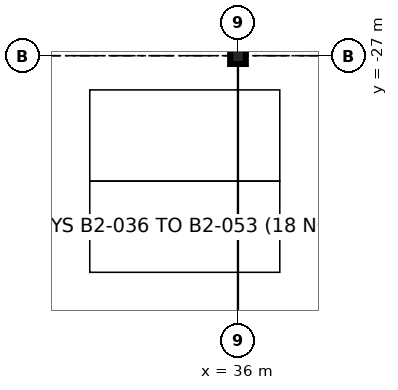
"""IFC4 building model, lengths in metres.
Left out: names, types, materials, properties, quantities, classifications, styles, units other than length and angle.
Written with IfcOpenShell. Run it as: python <this file> out.ifc"""

import sys

from ifc_helpers import new_model, si_unit, direction, frame, origin, origin_2d, place, context, subcontext, project, spatial, i_section, extrude, element, save


model = new_model("IFC4")
c1 = context("Model", 3, precision=1e-05, world=origin(), true_north=direction((0.0, 1.0)))
c2 = subcontext(c1, "Body", "Model", "MODEL_VIEW")
j1 = project(units=[si_unit("LENGTHUNIT", "METRE"), si_unit("PLANEANGLEUNIT", "RADIAN")], contexts=[c1])
p1 = place(None, origin())
s1 = spatial("IfcSite", under=j1, at=p1, CompositionType="ELEMENT")
p2 = place(p1, origin())
s2 = spatial("IfcBuilding", under=s1, at=p2, CompositionType="ELEMENT")
p3 = place(p2, frame((0.0, 0.0, -7.2)))
s3 = spatial("IfcBuildingStorey", under=s2, at=p3, CompositionType="ELEMENT", Elevation=-7.2)
p4 = place(p3, frame((36.0, -27.0, -0.25), z_axis=(0.0, 0.0, 1.0), x_axis=(1.0, 0.0, 0.0)))
e1 = element("IfcColumn", 1, at=p4, inside=s3, PredefinedType="COLUMN", context=c2, shape_type="SweptSolid", body=[
    extrude(i_section(OverallWidth=0.411, OverallDepth=0.434, WebThickness=0.036, FlangeThickness=0.057, at=origin_2d()), origin(), (0.0, 0.0, 1.0), 3.85),
])
save(model, sys.argv[1])
